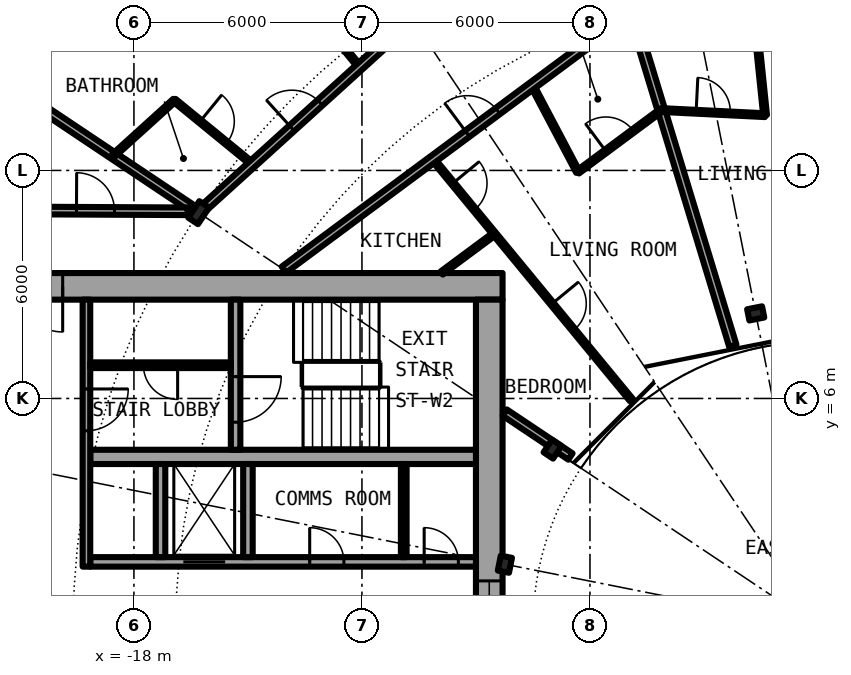
"""IFC4 building model, lengths in metres.
Left out: names, types, materials, properties, quantities, classifications, styles, units other than length and angle.
Written with IfcOpenShell. Run it as: python <this file> out.ifc"""

import sys

from ifc_helpers import new_model, si_unit, direction, frame, frame_2d, origin, origin_2d, place, context, subcontext, project, spatial, rectangle, i_section, extrude, element, fill, save


model = new_model("IFC4")
c1 = context("Model", 3, precision=1e-05, world=origin(), true_north=direction((0.0, 1.0)))
c2 = subcontext(c1, "Body", "Model", "MODEL_VIEW")
j1 = project(units=[si_unit("LENGTHUNIT", "METRE"), si_unit("PLANEANGLEUNIT", "RADIAN")], contexts=[c1])
p1 = place(None, origin())
s1 = spatial("IfcSite", under=j1, at=p1, CompositionType="ELEMENT")
p2 = place(p1, origin())
s2 = spatial("IfcBuilding", under=s1, at=p2, CompositionType="ELEMENT")
p3 = place(p2, frame((0.0, 0.0, 81.9)))
s3 = spatial("IfcBuildingStorey", under=s2, at=p3, CompositionType="ELEMENT", Elevation=81.9)
p4 = place(p3, frame((-16.297, 10.889, 0.0), z_axis=(0.0, 0.0, 1.0), x_axis=(-0.831469612303, 0.55557023302, 0.0)))
e1 = element("IfcColumn", 1, at=p4, inside=s3, PredefinedType="COLUMN", context=c2, shape_type="SweptSolid", body=[
    extrude(i_section(OverallWidth=0.306, OverallDepth=0.524, WebThickness=0.021, FlangeThickness=0.04, FilletRadius=0.027, at=origin_2d()), origin(), (0.0, 0.0, 1.0), 3.05),
])
for number, where, z_axis, x_axis in (
    (2, (-1.639, 8.239, 0.0), (0.0, 0.0, 1.0), (-0.195, 0.981, 0.0)),
    (3, (-6.984, 4.667, 0.0), (0.0, 0.0, 1.0), (-0.831, 0.556, 0.0)),
    (4, (-8.239, 1.639, 0.0), (0.0, 0.0, 1.0), (-0.981, 0.195, 0.0)),
):
    element("IfcColumn", number, at=place(p3, frame(where, z_axis=z_axis, x_axis=x_axis)), inside=s3, PredefinedType="COLUMN", context=c2, shape_type="SweptSolid", body=[
        extrude(i_section(OverallWidth=0.3, OverallDepth=0.4, WebThickness=0.013, FlangeThickness=0.024, FilletRadius=0.027, at=origin_2d()), origin(), (0.0, 0.0, 1.0), 3.05),
    ])
p5 = place(p3, frame((-19.304, 19.304, 0.0), z_axis=(0.0, 0.0, 1.0), x_axis=(-0.634382322723, -0.773019449054, 0.0)))
e5 = element("IfcWall", 5, at=p5, inside=s3, PredefinedType="SOLIDWALL", context=c2, shape_type="SweptSolid", body=[
    extrude(rectangle(XDim=5.352, YDim=0.25, at=frame_2d((2.676, 0.0))), origin(), (0.0, 0.0, 1.0), 2.7),
])
p6 = place(p5, frame((0.841, 0.0, 0.0)))
e6 = element("IfcOpeningElement", 6, at=p6, cuts=e5, PredefinedType="OPENING", context=c2, shape_type="SweptSolid", body=[
    extrude(rectangle(XDim=1.0, YDim=2.2, at=frame_2d((0.5, 1.1))), frame((0.0, 0.135, 0.0), z_axis=(0.0, -1.0, 0.0), x_axis=(1.0, 0.0, 0.0)), (0.0, 0.0, 1.0), 0.27),
])
p7 = place(p5, frame((3.111, 0.0, 0.3)))
e7 = element("IfcOpeningElement", 7, at=p7, cuts=e5, PredefinedType="OPENING", context=c2, shape_type="SweptSolid", body=[
    extrude(rectangle(XDim=1.8, YDim=2.1, at=frame_2d((0.9, 1.05))), frame((0.0, 0.135, 0.0), z_axis=(0.0, -1.0, 0.0), x_axis=(1.0, 0.0, 0.0)), (0.0, 0.0, 1.0), 0.27),
])
p8 = place(p3, frame((-8.3, 8.95, 0.0), z_axis=(0.0, 0.0, 1.0), x_axis=(-1.0, 0.0, 0.0)))
e8 = element("IfcWall", 8, at=p8, inside=s3, PredefinedType="SHEAR", context=c2, shape_type="SweptSolid", body=[
    extrude(rectangle(XDim=14.0, YDim=0.7, at=frame_2d((7.0, 0.0))), origin(), (0.0, 0.0, 1.0), 3.05),
])
p9 = place(p8, frame((11.575, 0.0, 0.0)))
e9 = element("IfcOpeningElement", 9, at=p9, cuts=e8, PredefinedType="OPENING", context=c2, shape_type="SweptSolid", body=[
    extrude(rectangle(XDim=1.2, YDim=2.3, at=frame_2d((0.6, 1.15))), frame((0.0, 0.36, 0.0), z_axis=(0.0, -1.0, 0.0), x_axis=(1.0, 0.0, 0.0)), (0.0, 0.0, 1.0), 0.72),
])
p10 = place(p3, frame((-8.65, 8.6, 0.0), z_axis=(0.0, 0.0, 1.0), x_axis=(0.0, -1.0, 0.0)))
e10 = element("IfcWall", 10, at=p10, inside=s3, PredefinedType="SHEAR", context=c2, shape_type="SweptSolid", body=[
    extrude(rectangle(XDim=17.2, YDim=0.7, at=frame_2d((8.6, 0.0))), origin(), (0.0, 0.0, 1.0), 3.05),
])
p11 = place(p10, frame((7.4, 0.0, 0.1)))
e11 = element("IfcOpeningElement", 11, at=p11, cuts=e10, PredefinedType="OPENING", context=c2, shape_type="SweptSolid", body=[
    extrude(rectangle(XDim=2.4, YDim=2.2, at=frame_2d((1.2, 1.1))), frame((0.0, 0.36, 0.0), z_axis=(0.0, -1.0, 0.0), x_axis=(1.0, 0.0, 0.0)), (0.0, 0.0, 1.0), 0.72),
])
p12 = place(p3, frame((-19.15, 1.7, 0.0), z_axis=(0.0, 0.0, 1.0), x_axis=(1.0, 0.0, 0.0)))
e12 = element("IfcWall", 12, at=p12, inside=s3, PredefinedType="SHEAR", context=c2, shape_type="SweptSolid", body=[
    extrude(rectangle(XDim=10.15, YDim=0.25, at=frame_2d((5.075, 0.0))), origin(), (0.0, 0.0, 1.0), 3.05),
])
p13 = place(p12, frame((2.45, 0.0, 0.0)))
e13 = element("IfcOpeningElement", 13, at=p13, cuts=e12, PredefinedType="OPENING", context=c2, shape_type="SweptSolid", body=[
    extrude(rectangle(XDim=1.1, YDim=2.3, at=frame_2d((0.55, 1.15))), frame((0.0, 0.135, 0.0), z_axis=(0.0, -1.0, 0.0), x_axis=(1.0, 0.0, 0.0)), (0.0, 0.0, 1.0), 0.27),
])
p14 = place(p12, frame((8.788, 0.0, 0.0)))
e14 = element("IfcOpeningElement", 14, at=p14, cuts=e12, PredefinedType="OPENING", context=c2, shape_type="SweptSolid", body=[
    extrude(rectangle(XDim=0.9, YDim=2.3, at=frame_2d((0.45, 1.15))), frame((0.0, 0.135, 0.0), z_axis=(0.0, -1.0, 0.0), x_axis=(1.0, 0.0, 0.0)), (0.0, 0.0, 1.0), 0.27),
])
p15 = place(p12, frame((5.775, 0.0, 0.0)))
e15 = element("IfcOpeningElement", 15, at=p15, cuts=e12, PredefinedType="OPENING", context=c2, shape_type="SweptSolid", body=[
    extrude(rectangle(XDim=0.9, YDim=2.3, at=frame_2d((0.45, 1.15))), frame((0.0, 0.135, 0.0), z_axis=(0.0, -1.0, 0.0), x_axis=(1.0, 0.0, 0.0)), (0.0, 0.0, 1.0), 0.27),
])
p16 = place(p3, frame((-9.0, 4.462, 0.0), z_axis=(0.0, 0.0, 1.0), x_axis=(-1.0, 0.0, 0.0)))
e16 = element("IfcWall", 16, at=p16, inside=s3, PredefinedType="SHEAR", context=c2, shape_type="SweptSolid", body=[
    extrude(rectangle(XDim=10.15, YDim=0.375, at=frame_2d((5.075, 0.0))), origin(), (0.0, 0.0, 1.0), 3.05),
])
p17 = place(p3, frame((-15.325, 8.6, 0.0), z_axis=(0.0, 0.0, 1.0), x_axis=(0.0, -1.0, 0.0)))
e17 = element("IfcWall", 17, at=p17, inside=s3, PredefinedType="SHEAR", context=c2, shape_type="SweptSolid", body=[
    extrude(rectangle(XDim=3.95, YDim=0.25, at=frame_2d((1.975, 0.0))), origin(), (0.0, 0.0, 1.0), 3.05),
])
p18 = place(p17, frame((2.025, 0.0, 0.0)))
e18 = element("IfcOpeningElement", 18, at=p18, cuts=e17, PredefinedType="OPENING", context=c2, shape_type="SweptSolid", body=[
    extrude(rectangle(XDim=1.2, YDim=2.3, at=frame_2d((0.6, 1.15))), frame((0.0, 0.135, 0.0), z_axis=(0.0, -1.0, 0.0), x_axis=(1.0, 0.0, 0.0)), (0.0, 0.0, 1.0), 0.27),
])
for number, where, z_axis, x_axis in (
    (19, (-15.0, 1.825, 0.0), (0.0, 0.0, 1.0), (0.0, 1.0, 0.0)),
    (20, (-17.3, 1.825, 0.0), (0.0, 0.0, 1.0), (0.0, 1.0, 0.0)),
):
    element("IfcWall", number, at=place(p3, frame(where, z_axis=z_axis, x_axis=x_axis)), inside=s3, PredefinedType="SOLIDWALL", context=c2, shape_type="SweptSolid", body=[
        extrude(rectangle(XDim=2.45, YDim=0.25, at=frame_2d((1.225, 0.0))), origin(), (0.0, 0.0, 1.0), 2.7),
    ])
p19 = place(p3, frame((-19.25, 8.6, 0.0), z_axis=(0.0, 0.0, 1.0), x_axis=(0.0, -1.0, 0.0)))
e21 = element("IfcWall", 21, at=p19, inside=s3, PredefinedType="SOLIDWALL", context=c2, shape_type="SweptSolid", body=[
    extrude(rectangle(XDim=7.025, YDim=0.2, at=frame_2d((3.513, 0.0))), origin(), (0.0, 0.0, 1.0), 2.7),
])
p20 = place(p19, frame((2.35, 0.0, 0.0)))
e22 = element("IfcOpeningElement", 22, at=p20, cuts=e21, PredefinedType="OPENING", context=c2, shape_type="SweptSolid", body=[
    extrude(rectangle(XDim=1.1, YDim=2.3, at=frame_2d((0.55, 1.15))), frame((0.0, 0.11, 0.0), z_axis=(0.0, -1.0, 0.0), x_axis=(1.0, 0.0, 0.0)), (0.0, 0.0, 1.0), 0.22),
])
p21 = place(p3, frame((-10.9, 1.825, 0.0), z_axis=(0.0, 0.0, 1.0), x_axis=(0.0, 1.0, 0.0)))
e23 = element("IfcWall", 23, at=p21, inside=s3, PredefinedType="PARTITIONING", context=c2, shape_type="SweptSolid", body=[
    extrude(rectangle(XDim=2.45, YDim=0.15, at=frame_2d((1.225, 0.0))), origin(), (0.0, 0.0, 1.0), 2.7),
])
p22 = place(p3, frame((-15.45, 6.875, 0.0), z_axis=(0.0, 0.0, 1.0), x_axis=(-1.0, 0.0, 0.0)))
e24 = element("IfcWall", 24, at=p22, inside=s3, PredefinedType="PARTITIONING", context=c2, shape_type="SweptSolid", body=[
    extrude(rectangle(XDim=3.7, YDim=0.15, at=frame_2d((1.85, 0.0))), origin(), (0.0, 0.0, 1.0), 2.7),
])
p23 = place(p22, frame((1.4, 0.0, 0.0)))
e25 = element("IfcOpeningElement", 25, at=p23, cuts=e24, PredefinedType="OPENING", context=c2, shape_type="SweptSolid", body=[
    extrude(rectangle(XDim=0.9, YDim=2.3, at=frame_2d((0.45, 1.15))), frame((0.0, 0.085, 0.0), z_axis=(0.0, -1.0, 0.0), x_axis=(1.0, 0.0, 0.0)), (0.0, 0.0, 1.0), 0.17),
])
p24 = place(p3, frame((-22.595, 15.098, 0.0), z_axis=(0.0, 0.0, 1.0), x_axis=(0.831382022135, -0.555701298605, 0.0)))
e26 = element("IfcWall", 26, at=p24, inside=s3, PredefinedType="PARTITIONING", context=c2, shape_type="SweptSolid", body=[
    extrude(rectangle(XDim=7.313, YDim=0.2, at=frame_2d((3.657, 0.0))), origin(), (0.0, 0.0, 1.0), 2.7),
])
p25 = place(p3, frame((-17.221, 21.022, 0.0), z_axis=(0.0, 0.0, 1.0), x_axis=(0.633735868108, -0.773549513266, 0.0)))
e27 = element("IfcWall", 27, at=p25, inside=s3, PredefinedType="PARTITIONING", context=c2, shape_type="SweptSolid", body=[
    extrude(rectangle(XDim=8.139, YDim=0.1, at=frame_2d((4.069, 0.0))), origin(), (0.0, 0.0, 1.0), 2.7),
])
p26 = place(p25, frame((6.378, 0.0, 0.0)))
e28 = element("IfcOpeningElement", 28, at=p26, cuts=e27, PredefinedType="OPENING", context=c2, shape_type="SweptSolid", body=[
    extrude(rectangle(XDim=0.9, YDim=2.3, at=frame_2d((0.45, 1.15))), frame((0.0, 0.06, 0.0), z_axis=(0.0, -1.0, 0.0), x_axis=(1.0, 0.0, 0.0)), (0.0, 0.0, 1.0), 0.12),
])
p27 = place(p25, frame((2.308, 0.0, 0.0)))
e29 = element("IfcOpeningElement", 29, at=p27, cuts=e27, PredefinedType="OPENING", context=c2, shape_type="SweptSolid", body=[
    extrude(rectangle(XDim=0.9, YDim=2.3, at=frame_2d((0.45, 1.15))), frame((0.0, 0.06, 0.0), z_axis=(0.0, -1.0, 0.0), x_axis=(1.0, 0.0, 0.0)), (0.0, 0.0, 1.0), 0.12),
])
p28 = place(p3, frame((-16.936, 13.845, 0.0), z_axis=(0.0, 0.0, 1.0), x_axis=(0.774162545943, -0.632986850147, 0.0)))
e30 = element("IfcWall", 30, at=p28, inside=s3, PredefinedType="PARTITIONING", context=c2, shape_type="SweptSolid", body=[
    extrude(rectangle(XDim=2.649, YDim=0.1, at=frame_2d((1.325, 0.0))), origin(), (0.0, 0.0, 1.0), 2.7),
])
p29 = place(p28, frame((0.875, 0.0, 0.0)))
e31 = element("IfcOpeningElement", 31, at=p29, cuts=e30, PredefinedType="OPENING", context=c2, shape_type="SweptSolid", body=[
    extrude(rectangle(XDim=0.9, YDim=2.3, at=frame_2d((0.45, 1.15))), frame((0.0, 0.06, 0.0), z_axis=(0.0, -1.0, 0.0), x_axis=(1.0, 0.0, 0.0)), (0.0, 0.0, 1.0), 0.12),
])
p30 = place(p3, frame((-10.132, 12.296, 0.0), z_axis=(0.0, 0.0, 1.0), x_axis=(0.635976043025, -0.771708800454, 0.0)))
e32 = element("IfcWall", 32, at=p30, inside=s3, PredefinedType="PARTITIONING", context=c2, shape_type="SweptSolid", body=[
    extrude(rectangle(XDim=8.213, YDim=0.1, at=frame_2d((4.106, 0.0))), origin(), (0.0, 0.0, 1.0), 2.7),
])
p31 = place(p30, frame((0.823, 0.0, 0.0)))
e33 = element("IfcOpeningElement", 33, at=p31, cuts=e32, PredefinedType="OPENING", context=c2, shape_type="SweptSolid", body=[
    extrude(rectangle(XDim=0.9, YDim=2.3, at=frame_2d((0.45, 1.15))), frame((0.0, 0.06, 0.0), z_axis=(0.0, -1.0, 0.0), x_axis=(1.0, 0.0, 0.0)), (0.0, 0.0, 1.0), 0.12),
])
p32 = place(p30, frame((4.929, 0.0, 0.0)))
e34 = element("IfcOpeningElement", 34, at=p32, cuts=e32, PredefinedType="OPENING", context=c2, shape_type="SweptSolid", body=[
    extrude(rectangle(XDim=0.9, YDim=2.3, at=frame_2d((0.45, 1.15))), frame((0.0, 0.06, 0.0), z_axis=(0.0, -1.0, 0.0), x_axis=(1.0, 0.0, 0.0)), (0.0, 0.0, 1.0), 0.12),
])
p33 = place(p3, frame((-7.519, 14.234, 0.0), z_axis=(0.0, 0.0, 1.0), x_axis=(0.467001992543, -0.884256263173, 0.0)))
e35 = element("IfcWall", 35, at=p33, inside=s3, PredefinedType="PARTITIONING", context=c2, shape_type="SweptSolid", body=[
    extrude(rectangle(XDim=2.572, YDim=0.1, at=frame_2d((1.286, 0.0))), origin(), (0.0, 0.0, 1.0), 2.7),
])
p34 = place(p3, frame((-4.906, 16.172, 0.0), z_axis=(0.0, 0.0, 1.0), x_axis=(0.290323311932, -0.956928615179, 0.0)))
e36 = element("IfcWall", 36, at=p34, inside=s3, PredefinedType="PARTITIONING", context=c2, shape_type="SweptSolid", body=[
    extrude(rectangle(XDim=9.179, YDim=0.2, at=frame_2d((4.59, 0.0))), origin(), (0.0, 0.0, 1.0), 2.7),
])
p35 = place(p3, frame((-1.656, 16.013, 0.0), z_axis=(0.0, 0.0, 1.0), x_axis=(0.102594773028, -0.994723234145, 0.0)))
e37 = element("IfcWall", 37, at=p35, inside=s3, PredefinedType="PARTITIONING", context=c2, shape_type="SweptSolid", body=[
    extrude(rectangle(XDim=2.573, YDim=0.1, at=frame_2d((1.286, 0.0))), origin(), (0.0, 0.0, 1.0), 2.7),
])
p36 = place(p3, frame((-6.513, 4.472, 0.0), z_axis=(0.0, 0.0, 1.0), x_axis=(-0.831382204863, 0.555701025225, 0.0)))
e38 = element("IfcWall", 38, at=p36, inside=s3, PredefinedType="PARTITIONING", context=c2, shape_type="SweptSolid", body=[
    extrude(rectangle(XDim=2.082, YDim=0.2, at=frame_2d((1.041, 0.0))), origin(), (0.0, 0.0, 1.0), 2.7),
])
p37 = place(p3, frame((-21.675, 10.95, 0.0), z_axis=(0.0, 0.0, 1.0), x_axis=(0.999988019025, -0.004895079807, 0.0)))
e39 = element("IfcWall", 39, at=p37, inside=s3, PredefinedType="PARTITIONING", context=c2, shape_type="SweptSolid", body=[
    extrude(rectangle(XDim=5.087, YDim=0.2, at=frame_2d((2.543, 0.0))), origin(), (0.0, 0.0, 1.0), 2.7),
])
p38 = place(p37, frame((2.163, 0.0, 0.0)))
e40 = element("IfcOpeningElement", 40, at=p38, cuts=e39, PredefinedType="OPENING", context=c2, shape_type="SweptSolid", body=[
    extrude(rectangle(XDim=1.0, YDim=2.3, at=frame_2d((0.5, 1.15))), frame((0.0, 0.11, 0.0), z_axis=(0.0, -1.0, 0.0), x_axis=(1.0, 0.0, 0.0)), (0.0, 0.0, 1.0), 0.22),
])
p39 = place(p3, frame((-9.903, 9.3, 0.0), z_axis=(0.0, 0.0, 1.0), x_axis=(0.803135014325, 0.595797070121, 0.0)))
e41 = element("IfcWall", 41, at=p39, inside=s3, PredefinedType="PARTITIONING", context=c2, shape_type="SweptSolid", body=[
    extrude(rectangle(XDim=1.732, YDim=0.1, at=frame_2d((0.866, 0.0))), origin(), (0.0, 0.0, 1.0), 2.7),
])
p40 = place(p3, frame((-6.318, 11.96, 0.0), z_axis=(0.0, 0.0, 1.0), x_axis=(0.803128348509, 0.595806055542, 0.0)))
e42 = element("IfcWall", 42, at=p40, inside=s3, PredefinedType="PARTITIONING", context=c2, shape_type="SweptSolid", body=[
    extrude(rectangle(XDim=2.734, YDim=0.1, at=frame_2d((1.367, 0.0))), origin(), (0.0, 0.0, 1.0), 2.7),
])
p41 = place(p40, frame((0.917, 0.0, 0.0)))
e43 = element("IfcOpeningElement", 43, at=p41, cuts=e42, PredefinedType="OPENING", context=c2, shape_type="SweptSolid", body=[
    extrude(rectangle(XDim=0.9, YDim=2.3, at=frame_2d((0.45, 1.15))), frame((0.0, 0.06, 0.0), z_axis=(0.0, -1.0, 0.0), x_axis=(1.0, 0.0, 0.0)), (0.0, 0.0, 1.0), 0.12),
])
p42 = place(p3, frame((-4.122, 13.589, 0.0), z_axis=(0.0, 0.0, 1.0), x_axis=(0.998779365748, -0.049394114582, 0.0)))
e44 = element("IfcWall", 44, at=p42, inside=s3, PredefinedType="PARTITIONING", context=c2, shape_type="SweptSolid", body=[
    extrude(rectangle(XDim=2.733, YDim=0.1, at=frame_2d((1.367, 0.0))), origin(), (0.0, 0.0, 1.0), 2.7),
])
p43 = place(p42, frame((0.917, 0.0, 0.0)))
e45 = element("IfcOpeningElement", 45, at=p43, cuts=e44, PredefinedType="OPENING", context=c2, shape_type="SweptSolid", body=[
    extrude(rectangle(XDim=0.9, YDim=2.3, at=frame_2d((0.45, 1.15))), frame((0.0, 0.06, 0.0), z_axis=(0.0, -1.0, 0.0), x_axis=(1.0, 0.0, 0.0)), (0.0, 0.0, 1.0), 0.12),
])
p44 = place(p3, frame((-14.052, 9.389, 0.0), z_axis=(0.0, 0.0, 1.0), x_axis=(0.803204584823, 0.59570327758, 0.0)))
e46 = element("IfcWall", 46, at=p44, inside=s3, PredefinedType="PARTITIONING", context=c2, shape_type="SweptSolid", body=[
    extrude(rectangle(XDim=11.387, YDim=0.2, at=frame_2d((5.693, 0.0))), origin(), (0.0, 0.0, 1.0), 2.7),
])
p45 = place(p44, frame((6.007, 0.0, 0.0)))
e47 = element("IfcOpeningElement", 47, at=p45, cuts=e46, PredefinedType="OPENING", context=c2, shape_type="SweptSolid", body=[
    extrude(rectangle(XDim=1.0, YDim=2.3, at=frame_2d((0.5, 1.15))), frame((0.0, 0.11, 0.0), z_axis=(0.0, -1.0, 0.0), x_axis=(1.0, 0.0, 0.0)), (0.0, 0.0, 1.0), 0.22),
])
p46 = place(p3, frame((-16.18, 10.995, 0.0), z_axis=(0.0, 0.0, 1.0), x_axis=(0.741086986457, 0.671409024741, 0.0)))
e48 = element("IfcWall", 48, at=p46, inside=s3, PredefinedType="PARTITIONING", context=c2, shape_type="SweptSolid", body=[
    extrude(rectangle(XDim=9.373, YDim=0.2, at=frame_2d((4.687, 0.0))), origin(), (0.0, 0.0, 1.0), 2.38),
])
p47 = place(p46, frame((3.152, 0.0, 0.0)))
e49 = element("IfcOpeningElement", 49, at=p47, cuts=e48, PredefinedType="OPENING", context=c2, shape_type="SweptSolid", body=[
    extrude(rectangle(XDim=1.0, YDim=2.3, at=frame_2d((0.5, 1.15))), frame((0.0, 0.11, 0.0), z_axis=(0.0, -1.0, 0.0), x_axis=(1.0, 0.0, 0.0)), (0.0, 0.0, 1.0), 0.22),
])
p48 = place(p3, frame((-18.54, 12.392, 0.0), z_axis=(0.0, 0.0, 1.0), x_axis=(0.741319612235, 0.671152167929, 0.0)))
e50 = element("IfcWall", 50, at=p48, inside=s3, PredefinedType="PARTITIONING", context=c2, shape_type="SweptSolid", body=[
    extrude(rectangle(XDim=2.168, YDim=0.1, at=frame_2d((1.084, 0.0))), origin(), (0.0, 0.0, 1.0), 2.7),
])
p49 = place(p13, origin())
e51 = element("IfcDoor", 51, at=p49, inside=s3, OperationType="DOUBLE_DOOR_SLIDING", PredefinedType="DOOR", context=c2, shape_type="SweptSolid", body=[
    extrude(rectangle(XDim=1.1, YDim=2.3, at=frame_2d((0.55, 1.15))), frame((0.0, 0.025, 0.0), z_axis=(0.0, -1.0, 0.0), x_axis=(1.0, 0.0, 0.0)), (0.0, 0.0, 1.0), 0.05),
])
fill(e13, e51)
p50 = place(p14, origin())
e52 = element("IfcDoor", 52, at=p50, inside=s3, OperationType="SINGLE_SWING_LEFT", PredefinedType="DOOR", context=c2, shape_type="SweptSolid", body=[
    extrude(rectangle(XDim=0.9, YDim=2.3, at=frame_2d((0.45, 1.15))), frame((0.0, 0.025, 0.0), z_axis=(0.0, -1.0, 0.0), x_axis=(1.0, 0.0, 0.0)), (0.0, 0.0, 1.0), 0.05),
])
fill(e14, e52)
p51 = place(p15, origin())
e53 = element("IfcDoor", 53, at=p51, inside=s3, OperationType="SINGLE_SWING_LEFT", PredefinedType="DOOR", context=c2, shape_type="SweptSolid", body=[
    extrude(rectangle(XDim=0.9, YDim=2.3, at=frame_2d((0.45, 1.15))), frame((0.0, 0.025, 0.0), z_axis=(0.0, -1.0, 0.0), x_axis=(1.0, 0.0, 0.0)), (0.0, 0.0, 1.0), 0.05),
])
fill(e15, e53)
p52 = place(p23, origin())
e54 = element("IfcDoor", 54, at=p52, inside=s3, OperationType="SINGLE_SWING_LEFT", PredefinedType="DOOR", context=c2, shape_type="SweptSolid", body=[
    extrude(rectangle(XDim=0.9, YDim=2.3, at=frame_2d((0.45, 1.15))), frame((0.0, 0.025, 0.0), z_axis=(0.0, -1.0, 0.0), x_axis=(1.0, 0.0, 0.0)), (0.0, 0.0, 1.0), 0.05),
])
fill(e25, e54)
p53 = place(p18, origin())
e55 = element("IfcDoor", 55, at=p53, inside=s3, OperationType="SINGLE_SWING_LEFT", PredefinedType="DOOR", context=c2, shape_type="SweptSolid", body=[
    extrude(rectangle(XDim=1.2, YDim=2.3, at=frame_2d((0.6, 1.15))), frame((0.0, 0.025, 0.0), z_axis=(0.0, -1.0, 0.0), x_axis=(1.0, 0.0, 0.0)), (0.0, 0.0, 1.0), 0.05),
])
fill(e18, e55)
p54 = place(p20, origin())
e56 = element("IfcDoor", 56, at=p54, inside=s3, OperationType="SINGLE_SWING_RIGHT", PredefinedType="DOOR", context=c2, shape_type="SweptSolid", body=[
    extrude(rectangle(XDim=1.1, YDim=2.3, at=frame_2d((0.55, 1.15))), frame((0.0, 0.025, 0.0), z_axis=(0.0, -1.0, 0.0), x_axis=(1.0, 0.0, 0.0)), (0.0, 0.0, 1.0), 0.05),
])
fill(e22, e56)
p55 = place(p9, origin())
e57 = element("IfcDoor", 57, at=p55, inside=s3, OperationType="SINGLE_SWING_LEFT", PredefinedType="DOOR", context=c2, shape_type="SweptSolid", body=[
    extrude(rectangle(XDim=1.2, YDim=2.3, at=frame_2d((0.6, 1.15))), frame((0.0, 0.025, 0.0), z_axis=(0.0, -1.0, 0.0), x_axis=(1.0, 0.0, 0.0)), (0.0, 0.0, 1.0), 0.05),
])
fill(e9, e57)
p56 = place(p11, origin())
e58 = element("IfcWindow", 58, at=p56, inside=s3, PartitioningType="SINGLE_PANEL", PredefinedType="WINDOW", context=c2, shape_type="SweptSolid", body=[
    extrude(rectangle(XDim=2.4, YDim=2.2, at=frame_2d((1.2, 1.1))), frame((0.0, 0.03, 0.0), z_axis=(0.0, -1.0, 0.0), x_axis=(1.0, 0.0, 0.0)), (0.0, 0.0, 1.0), 0.06),
])
fill(e11, e58)
p57 = place(p47, origin())
e59 = element("IfcDoor", 59, at=p57, inside=s3, OperationType="SINGLE_SWING_LEFT", PredefinedType="DOOR", context=c2, shape_type="SweptSolid", body=[
    extrude(rectangle(XDim=1.0, YDim=2.3, at=frame_2d((0.5, 1.15))), frame((0.0, 0.025, 0.0), z_axis=(0.0, -1.0, 0.0), x_axis=(1.0, 0.0, 0.0)), (0.0, 0.0, 1.0), 0.05),
])
fill(e49, e59)
p58 = place(p29, origin())
e60 = element("IfcDoor", 60, at=p58, inside=s3, OperationType="SINGLE_SWING_LEFT", PredefinedType="DOOR", context=c2, shape_type="SweptSolid", body=[
    extrude(rectangle(XDim=0.9, YDim=2.3, at=frame_2d((0.45, 1.15))), frame((0.0, 0.025, 0.0), z_axis=(0.0, -1.0, 0.0), x_axis=(1.0, 0.0, 0.0)), (0.0, 0.0, 1.0), 0.05),
])
fill(e31, e60)
p59 = place(p43, origin())
e61 = element("IfcDoor", 61, at=p59, inside=s3, OperationType="SINGLE_SWING_LEFT", PredefinedType="DOOR", context=c2, shape_type="SweptSolid", body=[
    extrude(rectangle(XDim=0.9, YDim=2.3, at=frame_2d((0.45, 1.15))), frame((0.0, 0.025, 0.0), z_axis=(0.0, -1.0, 0.0), x_axis=(1.0, 0.0, 0.0)), (0.0, 0.0, 1.0), 0.05),
])
fill(e45, e61)
p60 = place(p45, origin())
e62 = element("IfcDoor", 62, at=p60, inside=s3, OperationType="SINGLE_SWING_RIGHT", PredefinedType="DOOR", context=c2, shape_type="SweptSolid", body=[
    extrude(rectangle(XDim=1.0, YDim=2.3, at=frame_2d((0.5, 1.15))), frame((0.0, 0.025, 0.0), z_axis=(0.0, -1.0, 0.0), x_axis=(1.0, 0.0, 0.0)), (0.0, 0.0, 1.0), 0.05),
])
fill(e47, e62)
p61 = place(p41, origin())
e63 = element("IfcDoor", 63, at=p61, inside=s3, OperationType="SINGLE_SWING_RIGHT", PredefinedType="DOOR", context=c2, shape_type="SweptSolid", body=[
    extrude(rectangle(XDim=0.9, YDim=2.3, at=frame_2d((0.45, 1.15))), frame((0.0, 0.025, 0.0), z_axis=(0.0, -1.0, 0.0), x_axis=(1.0, 0.0, 0.0)), (0.0, 0.0, 1.0), 0.05),
])
fill(e43, e63)
p62 = place(p31, origin())
e64 = element("IfcDoor", 64, at=p62, inside=s3, OperationType="SINGLE_SWING_LEFT", PredefinedType="DOOR", context=c2, shape_type="SweptSolid", body=[
    extrude(rectangle(XDim=0.9, YDim=2.3, at=frame_2d((0.45, 1.15))), frame((0.0, 0.025, 0.0), z_axis=(0.0, -1.0, 0.0), x_axis=(1.0, 0.0, 0.0)), (0.0, 0.0, 1.0), 0.05),
])
fill(e33, e64)
p63 = place(p32, origin())
e65 = element("IfcDoor", 65, at=p63, inside=s3, OperationType="SINGLE_SWING_RIGHT", PredefinedType="DOOR", context=c2, shape_type="SweptSolid", body=[
    extrude(rectangle(XDim=0.9, YDim=2.3, at=frame_2d((0.45, 1.15))), frame((0.0, 0.025, 0.0), z_axis=(0.0, -1.0, 0.0), x_axis=(1.0, 0.0, 0.0)), (0.0, 0.0, 1.0), 0.05),
])
fill(e34, e65)
p64 = place(p38, origin())
e66 = element("IfcDoor", 66, at=p64, inside=s3, OperationType="SINGLE_SWING_RIGHT", PredefinedType="DOOR", context=c2, shape_type="SweptSolid", body=[
    extrude(rectangle(XDim=1.0, YDim=2.3, at=frame_2d((0.5, 1.15))), frame((0.0, 0.025, 0.0), z_axis=(0.0, -1.0, 0.0), x_axis=(1.0, 0.0, 0.0)), (0.0, 0.0, 1.0), 0.05),
])
fill(e40, e66)
save(model, sys.argv[1])
